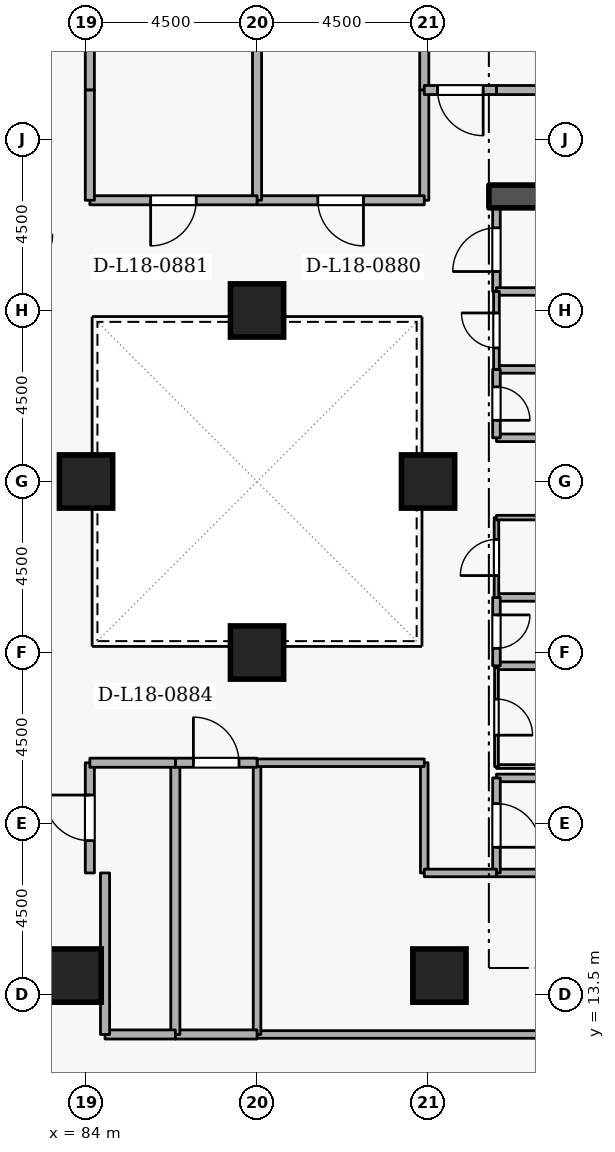
"""IFC4 building model, lengths in metres.
Left out: names, types, materials, properties, quantities, classifications, styles, units other than length and angle.
Written with IfcOpenShell. Run it as: python <this file> out.ifc"""

import sys

from ifc_helpers import new_model, si_unit, direction, frame, frame_2d, origin, origin_2d, place, context, subcontext, project, spatial, rectangle, extrude, element, fill, save


model = new_model("IFC4")
c1 = context("Model", 3, precision=1e-05, world=origin(), true_north=direction((0.0, 1.0)))
c2 = subcontext(c1, "Body", "Model", "MODEL_VIEW")
j1 = project(units=[si_unit("LENGTHUNIT", "METRE"), si_unit("PLANEANGLEUNIT", "RADIAN")], contexts=[c1])
p1 = place(None, origin())
s1 = spatial("IfcSite", under=j1, at=p1, CompositionType="ELEMENT")
p2 = place(p1, origin())
s2 = spatial("IfcBuilding", under=s1, at=p2, CompositionType="ELEMENT")
p3 = place(p2, frame((0.0, 0.0, 71.7)))
s3 = spatial("IfcBuildingStorey", under=s2, at=p3, CompositionType="ELEMENT", Elevation=71.7)
p4 = place(p3, frame((94.6, 34.5, 0.0), z_axis=(0.0, 0.0, 1.0), x_axis=(1.0, 0.0, 0.0)))
e1 = element("IfcWall", 1, at=p4, inside=s3, PredefinedType="SHEAR", context=c2, shape_type="SweptSolid", body=[
    extrude(rectangle(XDim=5.7, YDim=0.6, at=frame_2d((2.85, 0.0))), origin(), (0.0, 0.0, 1.0), 4.2),
])
for number, where, z_axis, x_axis in (
    (2, (93.3, 14.0, 0.0), (0.0, 0.0, 1.0), (1.0, 0.0, 0.0)),
    (3, (83.7, 14.0, 0.0), (0.0, 0.0, 1.0), (1.0, 0.0, 0.0)),
    (4, (93.0, 27.0, 0.0), (0.0, 0.0, 1.0), (1.0, 0.0, 0.0)),
    (5, (84.0, 27.0, 0.0), (0.0, 0.0, 1.0), (1.0, 0.0, 0.0)),
    (6, (88.5, 22.5, 0.0), (0.0, 0.0, 1.0), (1.0, 0.0, 0.0)),
    (7, (88.5, 31.5, 0.0), (0.0, 0.0, 1.0), (1.0, 0.0, 0.0)),
):
    element("IfcColumn", number, at=place(p3, frame(where, z_axis=z_axis, x_axis=x_axis)), inside=s3, PredefinedType="COLUMN", context=c2, shape_type="SweptSolid", body=[
        extrude(rectangle(XDim=1.4, YDim=1.4, at=origin_2d()), origin(), (0.0, 0.0, 1.0), 4.2),
    ])
p5 = place(p3, frame((94.8, 16.7, 0.0), z_axis=(0.0, 0.0, 1.0), x_axis=(1.0, 0.0, 0.0)))
e8 = element("IfcWall", 8, at=p5, inside=s3, PredefinedType="STANDARD", context=c2, shape_type="SweptSolid", body=[
    extrude(rectangle(XDim=5.7, YDim=0.2, at=frame_2d((2.85, 0.0))), origin(), (0.0, 0.0, 1.0), 3.86),
])
p6 = place(p5, frame((2.275, 0.0, 0.0)))
e9 = element("IfcOpeningElement", 9, at=p6, cuts=e8, PredefinedType="OPENING", context=c2, shape_type="SweptSolid", body=[
    extrude(rectangle(XDim=1.15, YDim=2.1, at=frame_2d((0.575, 1.05))), frame((0.0, 0.11, 0.0), z_axis=(0.0, -1.0, 0.0), x_axis=(1.0, 0.0, 0.0)), (0.0, 0.0, 1.0), 0.22),
])
p7 = place(p3, frame((97.1, 19.2, 0.0), z_axis=(0.0, 0.0, 1.0), x_axis=(-1.0, 0.0, 0.0)))
e10 = element("IfcWall", 10, at=p7, inside=s3, PredefinedType="STANDARD", context=c2, shape_type="SweptSolid", body=[
    extrude(rectangle(XDim=2.3, YDim=0.2, at=frame_2d((1.15, 0.0))), origin(), (0.0, 0.0, 1.0), 3.065),
])
p8 = place(p3, frame((94.8, 19.2, 0.0), z_axis=(0.0, 0.0, 1.0), x_axis=(0.0, -1.0, 0.0)))
e11 = element("IfcWall", 11, at=p8, inside=s3, PredefinedType="STANDARD", context=c2, shape_type="SweptSolid", body=[
    extrude(rectangle(XDim=2.5, YDim=0.2, at=frame_2d((1.25, 0.0))), origin(), (0.0, 0.0, 1.0), 3.86),
])
p9 = place(p8, frame((0.675, 0.0, 0.0)))
e12 = element("IfcOpeningElement", 12, at=p9, cuts=e11, PredefinedType="OPENING", context=c2, shape_type="SweptSolid", body=[
    extrude(rectangle(XDim=1.15, YDim=2.1, at=frame_2d((0.575, 1.05))), frame((0.0, 0.11, 0.0), z_axis=(0.0, -1.0, 0.0), x_axis=(1.0, 0.0, 0.0)), (0.0, 0.0, 1.0), 0.22),
])
for number, where, z_axis, x_axis in (
    (13, (94.8, 28.15, 0.0), (0.0, 0.0, 1.0), (1.0, 0.0, 0.0)),
    (14, (96.85, 29.95, 0.0), (0.0, 0.0, 1.0), (-1.0, 0.0, 0.0)),
):
    element("IfcWall", number, at=place(p3, frame(where, z_axis=z_axis, x_axis=x_axis)), inside=s3, PredefinedType="STANDARD", context=c2, shape_type="SweptSolid", body=[
        extrude(rectangle(XDim=2.05, YDim=0.2, at=frame_2d((1.025, 0.0))), origin(), (0.0, 0.0, 1.0), 3.86),
    ])
p10 = place(p3, frame((94.8, 29.95, 0.0), z_axis=(0.0, 0.0, 1.0), x_axis=(0.0, -1.0, 0.0)))
e15 = element("IfcWall", 15, at=p10, inside=s3, PredefinedType="STANDARD", context=c2, shape_type="SweptSolid", body=[
    extrude(rectangle(XDim=1.8, YDim=0.2, at=frame_2d((0.9, 0.0))), origin(), (0.0, 0.0, 1.0), 3.86),
])
p11 = place(p10, frame((0.46, 0.0, 0.0)))
e16 = element("IfcOpeningElement", 16, at=p11, cuts=e15, PredefinedType="OPENING", context=c2, shape_type="SweptSolid", body=[
    extrude(rectangle(XDim=0.88, YDim=2.04, at=frame_2d((0.44, 1.02))), frame((0.0, 0.11, 0.0), z_axis=(0.0, -1.0, 0.0), x_axis=(1.0, 0.0, 0.0)), (0.0, 0.0, 1.0), 0.22),
])
for number, where, z_axis, x_axis in (
    (17, (94.8, 22.15, 0.0), (0.0, 0.0, 1.0), (1.0, 0.0, 0.0)),
    (18, (96.85, 23.95, 0.0), (0.0, 0.0, 1.0), (-1.0, 0.0, 0.0)),
):
    element("IfcWall", number, at=place(p3, frame(where, z_axis=z_axis, x_axis=x_axis)), inside=s3, PredefinedType="STANDARD", context=c2, shape_type="SweptSolid", body=[
        extrude(rectangle(XDim=2.05, YDim=0.2, at=frame_2d((1.025, 0.0))), origin(), (0.0, 0.0, 1.0), 3.86),
    ])
p12 = place(p3, frame((94.8, 23.95, 0.0), z_axis=(0.0, 0.0, 1.0), x_axis=(0.0, -1.0, 0.0)))
e19 = element("IfcWall", 19, at=p12, inside=s3, PredefinedType="STANDARD", context=c2, shape_type="SweptSolid", body=[
    extrude(rectangle(XDim=1.8, YDim=0.2, at=frame_2d((0.9, 0.0))), origin(), (0.0, 0.0, 1.0), 3.86),
])
p13 = place(p12, frame((0.46, 0.0, 0.0)))
e20 = element("IfcOpeningElement", 20, at=p13, cuts=e19, PredefinedType="OPENING", context=c2, shape_type="SweptSolid", body=[
    extrude(rectangle(XDim=0.88, YDim=2.04, at=frame_2d((0.44, 1.02))), frame((0.0, 0.11, 0.0), z_axis=(0.0, -1.0, 0.0), x_axis=(1.0, 0.0, 0.0)), (0.0, 0.0, 1.0), 0.22),
])
p14 = place(p3, frame((94.8, 32.0, 0.0), z_axis=(0.0, 0.0, 1.0), x_axis=(0.0, 1.0, 0.0)))
e21 = element("IfcWall", 21, at=p14, inside=s3, PredefinedType="STANDARD", context=c2, shape_type="SweptSolid", body=[
    extrude(rectangle(XDim=2.2, YDim=0.2, at=frame_2d((1.1, 0.0))), origin(), (0.0, 0.0, 1.0), 3.86),
])
p15 = place(p14, frame((0.525, 0.0, 0.0)))
e22 = element("IfcOpeningElement", 22, at=p15, cuts=e21, PredefinedType="OPENING", context=c2, shape_type="SweptSolid", body=[
    extrude(rectangle(XDim=1.15, YDim=2.1, at=frame_2d((0.575, 1.05))), frame((0.0, 0.11, 0.0), z_axis=(0.0, -1.0, 0.0), x_axis=(1.0, 0.0, 0.0)), (0.0, 0.0, 1.0), 0.22),
])
p16 = place(p3, frame((96.85, 32.0, 0.0), z_axis=(0.0, 0.0, 1.0), x_axis=(-1.0, 0.0, 0.0)))
e23 = element("IfcWall", 23, at=p16, inside=s3, PredefinedType="STANDARD", context=c2, shape_type="SweptSolid", body=[
    extrude(rectangle(XDim=2.05, YDim=0.2, at=frame_2d((1.025, 0.0))), origin(), (0.0, 0.0, 1.0), 3.86),
])
p17 = place(p3, frame((92.9, 43.5, 0.0), z_axis=(0.0, 0.0, 1.0), x_axis=(0.0, -1.0, 0.0)))
e24 = element("IfcWall", 24, at=p17, inside=s3, PredefinedType="STANDARD", context=c2, shape_type="SweptSolid", body=[
    extrude(rectangle(XDim=6.2, YDim=0.24, at=frame_2d((3.1, 0.0))), origin(), (0.0, 0.0, 1.0), 3.86),
])
p18 = place(p3, frame((92.9, 37.3, 0.0), z_axis=(0.0, 0.0, 1.0), x_axis=(0.0, -1.0, 0.0)))
e25 = element("IfcWall", 25, at=p18, inside=s3, PredefinedType="STANDARD", context=c2, shape_type="SweptSolid", body=[
    extrude(rectangle(XDim=2.9, YDim=0.24, at=frame_2d((1.45, 0.0))), origin(), (0.0, 0.0, 1.0), 3.86),
])
p19 = place(p3, frame((92.9, 34.4, 0.0), z_axis=(0.0, 0.0, 1.0), x_axis=(-1.0, 0.0, 0.0)))
e26 = element("IfcWall", 26, at=p19, inside=s3, PredefinedType="STANDARD", context=c2, shape_type="SweptSolid", body=[
    extrude(rectangle(XDim=4.4, YDim=0.24, at=frame_2d((2.2, 0.0))), origin(), (0.0, 0.0, 1.0), 3.065),
])
p20 = place(p19, frame((1.6, 0.0, 0.0)))
e27 = element("IfcOpeningElement", 27, at=p20, cuts=e26, PredefinedType="OPENING", context=c2, shape_type="SweptSolid", body=[
    extrude(rectangle(XDim=1.2, YDim=2.1, at=frame_2d((0.6, 1.05))), frame((0.0, 0.13, 0.0), z_axis=(0.0, -1.0, 0.0), x_axis=(1.0, 0.0, 0.0)), (0.0, 0.0, 1.0), 0.26),
])
p21 = place(p3, frame((88.5, 34.4, 0.0), z_axis=(0.0, 0.0, 1.0), x_axis=(0.0, 1.0, 0.0)))
e28 = element("IfcWall", 28, at=p21, inside=s3, PredefinedType="STANDARD", context=c2, shape_type="SweptSolid", body=[
    extrude(rectangle(XDim=9.1, YDim=0.24, at=frame_2d((4.55, 0.0))), origin(), (0.0, 0.0, 1.0), 2.285),
])
p22 = place(p3, frame((84.1, 37.3, 0.0), z_axis=(0.0, 0.0, 1.0), x_axis=(0.0, 1.0, 0.0)))
e29 = element("IfcWall", 29, at=p22, inside=s3, PredefinedType="STANDARD", context=c2, shape_type="SweptSolid", body=[
    extrude(rectangle(XDim=6.2, YDim=0.24, at=frame_2d((3.1, 0.0))), origin(), (0.0, 0.0, 1.0), 3.86),
])
p23 = place(p3, frame((88.5, 34.4, 0.0), z_axis=(0.0, 0.0, 1.0), x_axis=(-1.0, 0.0, 0.0)))
e30 = element("IfcWall", 30, at=p23, inside=s3, PredefinedType="STANDARD", context=c2, shape_type="SweptSolid", body=[
    extrude(rectangle(XDim=4.4, YDim=0.24, at=frame_2d((2.2, 0.0))), origin(), (0.0, 0.0, 1.0), 3.065),
])
p24 = place(p23, frame((1.6, 0.0, 0.0)))
e31 = element("IfcOpeningElement", 31, at=p24, cuts=e30, PredefinedType="OPENING", context=c2, shape_type="SweptSolid", body=[
    extrude(rectangle(XDim=1.2, YDim=2.1, at=frame_2d((0.6, 1.05))), frame((0.0, 0.13, 0.0), z_axis=(0.0, -1.0, 0.0), x_axis=(1.0, 0.0, 0.0)), (0.0, 0.0, 1.0), 0.26),
])
p25 = place(p3, frame((84.1, 34.4, 0.0), z_axis=(0.0, 0.0, 1.0), x_axis=(0.0, 1.0, 0.0)))
e32 = element("IfcWall", 32, at=p25, inside=s3, PredefinedType="STANDARD", context=c2, shape_type="SweptSolid", body=[
    extrude(rectangle(XDim=2.9, YDim=0.24, at=frame_2d((1.45, 0.0))), origin(), (0.0, 0.0, 1.0), 3.86),
])
p26 = place(p3, frame((92.9, 19.6, 0.0), z_axis=(0.0, 0.0, 1.0), x_axis=(0.0, -1.0, 0.0)))
e33 = element("IfcWall", 33, at=p26, inside=s3, PredefinedType="STANDARD", context=c2, shape_type="SweptSolid", body=[
    extrude(rectangle(XDim=2.9, YDim=0.2, at=frame_2d((1.45, 0.0))), origin(), (0.0, 0.0, 1.0), 3.86),
])
p27 = place(p3, frame((92.9, 16.7, 0.0), z_axis=(0.0, 0.0, 1.0), x_axis=(1.0, 0.0, 0.0)))
e34 = element("IfcWall", 34, at=p27, inside=s3, PredefinedType="STANDARD", context=c2, shape_type="SweptSolid", body=[
    extrude(rectangle(XDim=1.9, YDim=0.2, at=frame_2d((0.95, 0.0))), origin(), (0.0, 0.0, 1.0), 3.86),
])
p28 = place(p3, frame((106.605, 12.45, 0.0), z_axis=(0.0, 0.0, 1.0), x_axis=(-1.0, 0.0, 0.0)))
e35 = element("IfcWall", 35, at=p28, inside=s3, PredefinedType="STANDARD", context=c2, shape_type="SweptSolid", body=[
    extrude(rectangle(XDim=18.105, YDim=0.2, at=frame_2d((9.052, 0.0))), origin(), (0.0, 0.0, 1.0), 3.365),
])
p29 = place(p3, frame((88.5, 12.45, 0.0), z_axis=(0.0, 0.0, 1.0), x_axis=(0.0, 1.0, 0.0)))
e36 = element("IfcWall", 36, at=p29, inside=s3, PredefinedType="STANDARD", context=c2, shape_type="SweptSolid", body=[
    extrude(rectangle(XDim=7.15, YDim=0.2, at=frame_2d((3.575, 0.0))), origin(), (0.0, 0.0, 1.0), 3.245),
])
p30 = place(p3, frame((88.5, 19.6, 0.0), z_axis=(0.0, 0.0, 1.0), x_axis=(1.0, 0.0, 0.0)))
e37 = element("IfcWall", 37, at=p30, inside=s3, PredefinedType="STANDARD", context=c2, shape_type="SweptSolid", body=[
    extrude(rectangle(XDim=4.4, YDim=0.2, at=frame_2d((2.2, 0.0))), origin(), (0.0, 0.0, 1.0), 3.065),
])
p31 = place(p3, frame((88.5, 12.45, 0.0), z_axis=(0.0, 0.0, 1.0), x_axis=(-1.0, 0.0, 0.0)))
e38 = element("IfcWall", 38, at=p31, inside=s3, PredefinedType="STANDARD", context=c2, shape_type="SweptSolid", body=[
    extrude(rectangle(XDim=2.15, YDim=0.24, at=frame_2d((1.075, 0.0))), origin(), (0.0, 0.0, 1.0), 3.86),
])
p32 = place(p3, frame((86.35, 12.45, 0.0), z_axis=(0.0, 0.0, 1.0), x_axis=(0.0, 1.0, 0.0)))
e39 = element("IfcWall", 39, at=p32, inside=s3, PredefinedType="STANDARD", context=c2, shape_type="SweptSolid", body=[
    extrude(rectangle(XDim=7.15, YDim=0.24, at=frame_2d((3.575, 0.0))), origin(), (0.0, 0.0, 1.0), 3.86),
])
p33 = place(p3, frame((86.35, 19.6, 0.0), z_axis=(0.0, 0.0, 1.0), x_axis=(1.0, 0.0, 0.0)))
e40 = element("IfcWall", 40, at=p33, inside=s3, PredefinedType="STANDARD", context=c2, shape_type="SweptSolid", body=[
    extrude(rectangle(XDim=2.15, YDim=0.24, at=frame_2d((1.075, 0.0))), origin(), (0.0, 0.0, 1.0), 3.065),
])
p34 = place(p33, frame((0.475, 0.0, 0.0)))
e41 = element("IfcOpeningElement", 41, at=p34, cuts=e40, PredefinedType="OPENING", context=c2, shape_type="SweptSolid", body=[
    extrude(rectangle(XDim=1.2, YDim=2.1, at=frame_2d((0.6, 1.05))), frame((0.0, 0.13, 0.0), z_axis=(0.0, -1.0, 0.0), x_axis=(1.0, 0.0, 0.0)), (0.0, 0.0, 1.0), 0.26),
])
p35 = place(p3, frame((84.1, 16.7, 0.0), z_axis=(0.0, 0.0, 1.0), x_axis=(0.0, 1.0, 0.0)))
e42 = element("IfcWall", 42, at=p35, inside=s3, PredefinedType="STANDARD", context=c2, shape_type="SweptSolid", body=[
    extrude(rectangle(XDim=2.9, YDim=0.24, at=frame_2d((1.45, 0.0))), origin(), (0.0, 0.0, 1.0), 3.86),
])
p36 = place(p35, frame((0.85, 0.0, 0.0)))
e43 = element("IfcOpeningElement", 43, at=p36, cuts=e42, PredefinedType="OPENING", context=c2, shape_type="SweptSolid", body=[
    extrude(rectangle(XDim=1.2, YDim=2.1, at=frame_2d((0.6, 1.05))), frame((0.0, 0.13, 0.0), z_axis=(0.0, -1.0, 0.0), x_axis=(1.0, 0.0, 0.0)), (0.0, 0.0, 1.0), 0.26),
])
p37 = place(p3, frame((84.1, 19.6, 0.0), z_axis=(0.0, 0.0, 1.0), x_axis=(1.0, 0.0, 0.0)))
e44 = element("IfcWall", 44, at=p37, inside=s3, PredefinedType="STANDARD", context=c2, shape_type="SweptSolid", body=[
    extrude(rectangle(XDim=2.25, YDim=0.24, at=frame_2d((1.125, 0.0))), origin(), (0.0, 0.0, 1.0), 3.065),
])
p38 = place(p3, frame((86.35, 12.45, 0.0), z_axis=(0.0, 0.0, 1.0), x_axis=(-1.0, 0.0, 0.0)))
e45 = element("IfcWall", 45, at=p38, inside=s3, PredefinedType="STANDARD", context=c2, shape_type="SweptSolid", body=[
    extrude(rectangle(XDim=1.85, YDim=0.24, at=frame_2d((0.925, 0.0))), origin(), (0.0, 0.0, 1.0), 3.86),
])
p39 = place(p3, frame((84.5, 12.45, 0.0), z_axis=(0.0, 0.0, 1.0), x_axis=(0.0, 1.0, 0.0)))
e46 = element("IfcWall", 46, at=p39, inside=s3, PredefinedType="STANDARD", context=c2, shape_type="SweptSolid", body=[
    extrude(rectangle(XDim=4.25, YDim=0.24, at=frame_2d((2.125, 0.0))), origin(), (0.0, 0.0, 1.0), 3.86),
])
p40 = place(p3, frame((97.852, 37.3, 0.0), z_axis=(0.0, 0.0, 1.0), x_axis=(-1.0, 0.0, 0.0)))
e47 = element("IfcWall", 47, at=p40, inside=s3, PredefinedType="STANDARD", context=c2, shape_type="SweptSolid", body=[
    extrude(rectangle(XDim=3.052, YDim=0.24, at=frame_2d((1.526, 0.0))), origin(), (0.0, 0.0, 1.0), 3.86),
])
p41 = place(p3, frame((94.8, 37.3, 0.0), z_axis=(0.0, 0.0, 1.0), x_axis=(-1.0, 0.0, 0.0)))
e48 = element("IfcWall", 48, at=p41, inside=s3, PredefinedType="STANDARD", context=c2, shape_type="SweptSolid", body=[
    extrude(rectangle(XDim=1.9, YDim=0.24, at=frame_2d((0.95, 0.0))), origin(), (0.0, 0.0, 1.0), 3.86),
])
p42 = place(p41, frame((0.35, 0.0, 0.0)))
e49 = element("IfcOpeningElement", 49, at=p42, cuts=e48, PredefinedType="OPENING", context=c2, shape_type="SweptSolid", body=[
    extrude(rectangle(XDim=1.2, YDim=2.1, at=frame_2d((0.6, 1.05))), frame((0.0, 0.13, 0.0), z_axis=(0.0, -1.0, 0.0), x_axis=(1.0, 0.0, 0.0)), (0.0, 0.0, 1.0), 0.26),
])
p43 = place(p3, frame((94.8, 19.5, 0.0), z_axis=(0.0, 0.0, 1.0), x_axis=(1.0, 0.0, 0.0)))
e50 = element("IfcWall", 50, at=p43, inside=s3, PredefinedType="PARTITIONING", context=c2, shape_type="SweptSolid", body=[
    extrude(rectangle(XDim=2.05, YDim=0.1, at=frame_2d((1.025, 0.0))), origin(), (0.0, 0.0, 1.0), 3.065),
])
p44 = place(p3, frame((94.8, 22.1, 0.0), z_axis=(0.0, 0.0, 1.0), x_axis=(0.0, -1.0, 0.0)))
e51 = element("IfcWall", 51, at=p44, inside=s3, PredefinedType="PARTITIONING", context=c2, shape_type="SweptSolid", body=[
    extrude(rectangle(XDim=2.6, YDim=0.1, at=frame_2d((1.3, 0.0))), origin(), (0.0, 0.0, 1.0), 3.86),
])
p45 = place(p44, frame((0.825, 0.0, 0.0)))
e52 = element("IfcOpeningElement", 52, at=p45, cuts=e51, PredefinedType="OPENING", context=c2, shape_type="SweptSolid", body=[
    extrude(rectangle(XDim=0.95, YDim=2.1, at=frame_2d((0.475, 1.05))), frame((0.0, 0.06, 0.0), z_axis=(0.0, -1.0, 0.0), x_axis=(1.0, 0.0, 0.0)), (0.0, 0.0, 1.0), 0.12),
])
p46 = place(p3, frame((94.8, 23.95, 0.0), z_axis=(0.0, 0.0, 1.0), x_axis=(0.0, 1.0, 0.0)))
e53 = element("IfcWall", 53, at=p46, inside=s3, PredefinedType="PARTITIONING", context=c2, shape_type="SweptSolid", body=[
    extrude(rectangle(XDim=2.1, YDim=0.12, at=frame_2d((1.05, 0.0))), origin(), (0.0, 0.0, 1.0), 3.86),
])
p47 = place(p46, frame((0.575, 0.0, 0.0)))
e54 = element("IfcOpeningElement", 54, at=p47, cuts=e53, PredefinedType="OPENING", context=c2, shape_type="SweptSolid", body=[
    extrude(rectangle(XDim=0.95, YDim=2.1, at=frame_2d((0.475, 1.05))), frame((0.0, 0.07, 0.0), z_axis=(0.0, -1.0, 0.0), x_axis=(1.0, 0.0, 0.0)), (0.0, 0.0, 1.0), 0.14),
])
p48 = place(p3, frame((94.8, 26.05, 0.0), z_axis=(0.0, 0.0, 1.0), x_axis=(1.0, 0.0, 0.0)))
e55 = element("IfcWall", 55, at=p48, inside=s3, PredefinedType="PARTITIONING", context=c2, shape_type="SweptSolid", body=[
    extrude(rectangle(XDim=2.05, YDim=0.12, at=frame_2d((1.025, 0.0))), origin(), (0.0, 0.0, 1.0), 3.86),
])
p49 = place(p3, frame((94.8, 29.95, 0.0), z_axis=(0.0, 0.0, 1.0), x_axis=(0.0, 1.0, 0.0)))
e56 = element("IfcWall", 56, at=p49, inside=s3, PredefinedType="PARTITIONING", context=c2, shape_type="SweptSolid", body=[
    extrude(rectangle(XDim=2.05, YDim=0.15, at=frame_2d((1.025, 0.0))), origin(), (0.0, 0.0, 1.0), 3.86),
])
p50 = place(p49, frame((0.565, 0.0, 0.0)))
e57 = element("IfcOpeningElement", 57, at=p50, cuts=e56, PredefinedType="OPENING", context=c2, shape_type="SweptSolid", body=[
    extrude(rectangle(XDim=0.92, YDim=2.08, at=frame_2d((0.46, 1.04))), frame((0.0, 0.085, 0.0), z_axis=(0.0, -1.0, 0.0), x_axis=(1.0, 0.0, 0.0)), (0.0, 0.0, 1.0), 0.17),
])
p51 = place(p9, origin())
e58 = element("IfcDoor", 58, at=p51, inside=s3, OperationType="SINGLE_SWING_RIGHT", PredefinedType="DOOR", context=c2, shape_type="SweptSolid", body=[
    extrude(rectangle(XDim=1.15, YDim=2.1, at=frame_2d((0.575, 1.05))), frame((0.0, 0.025, 0.0), z_axis=(0.0, -1.0, 0.0), x_axis=(1.0, 0.0, 0.0)), (0.0, 0.0, 1.0), 0.05),
])
fill(e12, e58)
p52 = place(p11, origin())
e59 = element("IfcDoor", 59, at=p52, inside=s3, OperationType="SINGLE_SWING_RIGHT", PredefinedType="DOOR", context=c2, shape_type="SweptSolid", body=[
    extrude(rectangle(XDim=0.88, YDim=2.04, at=frame_2d((0.44, 1.02))), frame((0.0, 0.025, 0.0), z_axis=(0.0, -1.0, 0.0), x_axis=(1.0, 0.0, 0.0)), (0.0, 0.0, 1.0), 0.05),
])
fill(e16, e59)
p53 = place(p13, origin())
e60 = element("IfcDoor", 60, at=p53, inside=s3, OperationType="SINGLE_SWING_LEFT", PredefinedType="DOOR", context=c2, shape_type="SweptSolid", body=[
    extrude(rectangle(XDim=0.88, YDim=2.04, at=frame_2d((0.44, 1.02))), frame((0.0, 0.025, 0.0), z_axis=(0.0, -1.0, 0.0), x_axis=(1.0, 0.0, 0.0)), (0.0, 0.0, 1.0), 0.05),
])
fill(e20, e60)
p54 = place(p45, origin())
e61 = element("IfcDoor", 61, at=p54, inside=s3, OperationType="SINGLE_SWING_RIGHT", PredefinedType="DOOR", context=c2, shape_type="SweptSolid", body=[
    extrude(rectangle(XDim=0.95, YDim=2.1, at=frame_2d((0.475, 1.05))), frame((0.0, 0.025, 0.0), z_axis=(0.0, -1.0, 0.0), x_axis=(1.0, 0.0, 0.0)), (0.0, 0.0, 1.0), 0.05),
])
fill(e52, e61)
p55 = place(p47, origin())
e62 = element("IfcDoor", 62, at=p55, inside=s3, OperationType="SINGLE_SWING_LEFT", PredefinedType="DOOR", context=c2, shape_type="SweptSolid", body=[
    extrude(rectangle(XDim=0.95, YDim=2.1, at=frame_2d((0.475, 1.05))), frame((0.0, 0.025, 0.0), z_axis=(0.0, -1.0, 0.0), x_axis=(1.0, 0.0, 0.0)), (0.0, 0.0, 1.0), 0.05),
])
fill(e54, e62)
p56 = place(p50, origin())
e63 = element("IfcDoor", 63, at=p56, inside=s3, OperationType="SINGLE_SWING_RIGHT", PredefinedType="DOOR", context=c2, shape_type="SweptSolid", body=[
    extrude(rectangle(XDim=0.92, YDim=2.08, at=frame_2d((0.46, 1.04))), frame((0.0, 0.025, 0.0), z_axis=(0.0, -1.0, 0.0), x_axis=(1.0, 0.0, 0.0)), (0.0, 0.0, 1.0), 0.05),
])
fill(e57, e63)
p57 = place(p15, origin())
e64 = element("IfcDoor", 64, at=p57, inside=s3, OperationType="SINGLE_SWING_LEFT", PredefinedType="DOOR", context=c2, shape_type="SweptSolid", body=[
    extrude(rectangle(XDim=1.15, YDim=2.1, at=frame_2d((0.575, 1.05))), frame((0.0, 0.025, 0.0), z_axis=(0.0, -1.0, 0.0), x_axis=(1.0, 0.0, 0.0)), (0.0, 0.0, 1.0), 0.05),
])
fill(e22, e64)
p58 = place(p20, origin())
e65 = element("IfcDoor", 65, at=p58, inside=s3, OperationType="SINGLE_SWING_LEFT", PredefinedType="DOOR", context=c2, shape_type="SweptSolid", body=[
    extrude(rectangle(XDim=1.2, YDim=2.1, at=frame_2d((0.6, 1.05))), frame((0.0, 0.025, 0.0), z_axis=(0.0, -1.0, 0.0), x_axis=(1.0, 0.0, 0.0)), (0.0, 0.0, 1.0), 0.05),
])
fill(e27, e65)
p59 = place(p24, origin())
e66 = element("IfcDoor", 66, at=p59, inside=s3, OperationType="SINGLE_SWING_RIGHT", PredefinedType="DOOR", context=c2, shape_type="SweptSolid", body=[
    extrude(rectangle(XDim=1.2, YDim=2.1, at=frame_2d((0.6, 1.05))), frame((0.0, 0.025, 0.0), z_axis=(0.0, -1.0, 0.0), x_axis=(1.0, 0.0, 0.0)), (0.0, 0.0, 1.0), 0.05),
])
fill(e31, e66)
p60 = place(p34, origin())
e67 = element("IfcDoor", 67, at=p60, inside=s3, OperationType="SINGLE_SWING_LEFT", PredefinedType="DOOR", context=c2, shape_type="SweptSolid", body=[
    extrude(rectangle(XDim=1.2, YDim=2.1, at=frame_2d((0.6, 1.05))), frame((0.0, 0.025, 0.0), z_axis=(0.0, -1.0, 0.0), x_axis=(1.0, 0.0, 0.0)), (0.0, 0.0, 1.0), 0.05),
])
fill(e41, e67)
p61 = place(p36, origin())
e68 = element("IfcDoor", 68, at=p61, inside=s3, OperationType="SINGLE_SWING_RIGHT", PredefinedType="DOOR", context=c2, shape_type="SweptSolid", body=[
    extrude(rectangle(XDim=1.2, YDim=2.1, at=frame_2d((0.6, 1.05))), frame((0.0, 0.025, 0.0), z_axis=(0.0, -1.0, 0.0), x_axis=(1.0, 0.0, 0.0)), (0.0, 0.0, 1.0), 0.05),
])
fill(e43, e68)
p62 = place(p42, origin())
e69 = element("IfcDoor", 69, at=p62, inside=s3, OperationType="SINGLE_SWING_LEFT", PredefinedType="DOOR", context=c2, shape_type="SweptSolid", body=[
    extrude(rectangle(XDim=1.2, YDim=2.1, at=frame_2d((0.6, 1.05))), frame((0.0, 0.025, 0.0), z_axis=(0.0, -1.0, 0.0), x_axis=(1.0, 0.0, 0.0)), (0.0, 0.0, 1.0), 0.05),
])
fill(e49, e69)
save(model, sys.argv[1])
